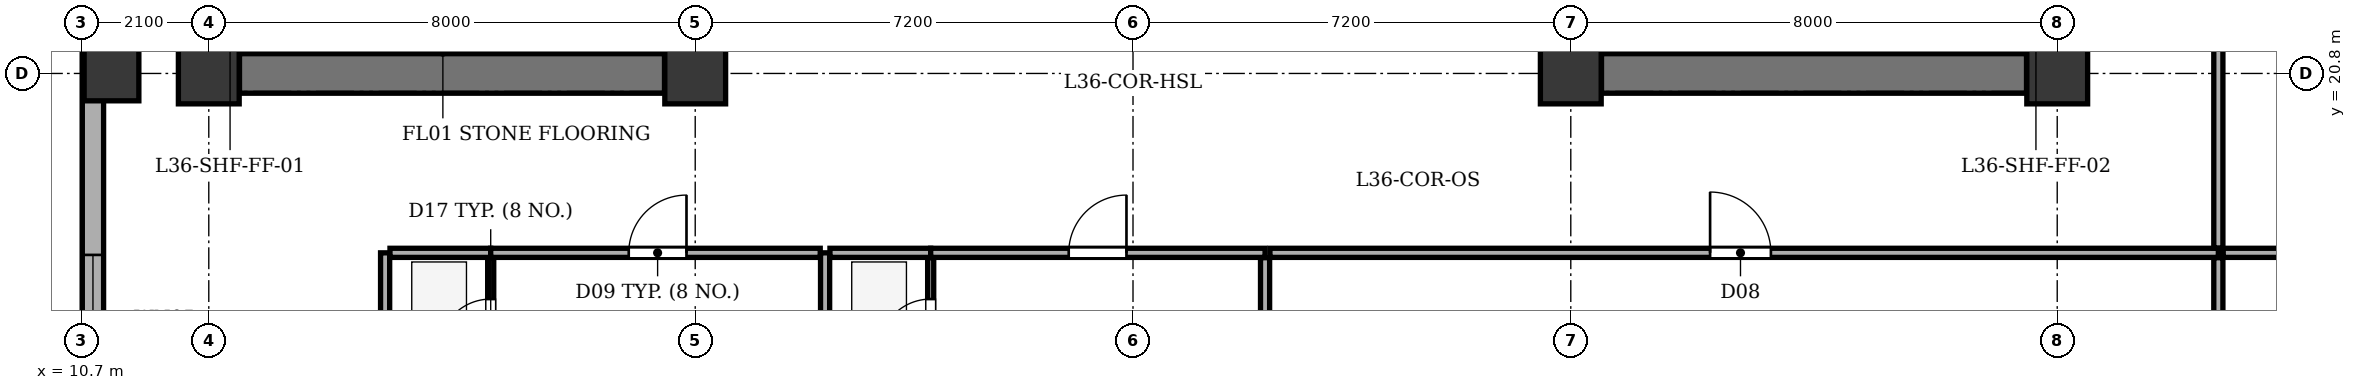
"""IFC4 building model, lengths in metres.
Left out: names, types, materials, properties, quantities, classifications, styles, units other than length and angle.
Written with IfcOpenShell. Run it as: python <this file> out.ifc"""

import sys

from ifc_helpers import new_model, si_unit, direction, frame, frame_2d, origin, origin_2d, place, context, subcontext, project, spatial, rectangle, extrude, element, fill, save


model = new_model("IFC4")
c1 = context("Model", 3, precision=1e-05, world=origin(), true_north=direction((0.0, 1.0)))
c2 = subcontext(c1, "Body", "Model", "MODEL_VIEW")
j1 = project(units=[si_unit("LENGTHUNIT", "METRE"), si_unit("PLANEANGLEUNIT", "RADIAN")], contexts=[c1])
p1 = place(None, origin())
s1 = spatial("IfcSite", under=j1, at=p1, CompositionType="ELEMENT")
p2 = place(p1, origin())
s2 = spatial("IfcBuilding", under=s1, at=p2, CompositionType="ELEMENT")
p3 = place(p2, frame((0.0, 0.0, 144.8)))
s3 = spatial("IfcBuildingStorey", under=s2, at=p3, CompositionType="ELEMENT", Elevation=144.8)
for number, where, z_axis, x_axis in (
    (1, (12.8, 20.8, 0.0), (0.0, 0.0, 1.0), (1.0, 0.0, 0.0)),
    (2, (20.8, 20.8, 0.0), (0.0, 0.0, 1.0), (1.0, 0.0, 0.0)),
    (3, (35.2, 20.8, 0.0), (0.0, 0.0, 1.0), (1.0, 0.0, 0.0)),
    (4, (43.2, 20.8, 0.0), (0.0, 0.0, 1.0), (1.0, 0.0, 0.0)),
):
    element("IfcColumn", number, at=place(p3, frame(where, z_axis=z_axis, x_axis=x_axis)), inside=s3, PredefinedType="COLUMN", context=c2, shape_type="SweptSolid", body=[
        extrude(rectangle(XDim=1.0, YDim=1.0, at=origin_2d()), origin(), (0.0, 0.0, 1.0), 3.5),
    ])
p4 = place(p3, frame((11.2, 20.8, 0.0), z_axis=(0.0, 0.0, 1.0), x_axis=(1.0, 0.0, 0.0)))
e5 = element("IfcColumn", 5, at=p4, inside=s3, PredefinedType="COLUMN", context=c2, shape_type="SweptSolid", body=[
    extrude(rectangle(XDim=0.9, YDim=0.9, at=origin_2d()), origin(), (0.0, 0.0, 1.0), 3.5),
])
p5 = place(p3, frame((10.895, 6.5, 0.0), z_axis=(0.0, 0.0, 1.0), x_axis=(0.0, 1.0, 0.0)))
e6 = element("IfcWall", 6, at=p5, inside=s3, PredefinedType="STANDARD", context=c2, shape_type="SweptSolid", body=[
    extrude(rectangle(XDim=35.0, YDim=0.35, at=frame_2d((17.5, 0.0))), origin(), (0.0, 0.0, 1.0), 2.785),
])
p6 = place(p5, frame((3.31, 0.0, 0.75)))
e7 = element("IfcOpeningElement", 7, at=p6, cuts=e6, PredefinedType="OPENING", context=c2, shape_type="SweptSolid", body=[
    extrude(rectangle(XDim=1.6, YDim=1.75, at=frame_2d((0.8, 0.875))), frame((0.0, 0.185, 0.0), z_axis=(0.0, -1.0, 0.0), x_axis=(1.0, 0.0, 0.0)), (0.0, 0.0, 1.0), 0.37),
])
p7 = place(p5, frame((9.216, 0.0, 0.75)))
e8 = element("IfcOpeningElement", 8, at=p7, cuts=e6, PredefinedType="OPENING", context=c2, shape_type="SweptSolid", body=[
    extrude(rectangle(XDim=2.1, YDim=1.75, at=frame_2d((1.05, 0.875))), frame((0.0, 0.185, 0.0), z_axis=(0.0, -1.0, 0.0), x_axis=(1.0, 0.0, 0.0)), (0.0, 0.0, 1.0), 0.37),
])
p8 = place(p5, frame((17.164, 0.0, 0.75)))
e9 = element("IfcOpeningElement", 9, at=p8, cuts=e6, PredefinedType="OPENING", context=c2, shape_type="SweptSolid", body=[
    extrude(rectangle(XDim=1.6, YDim=1.75, at=frame_2d((0.8, 0.875))), frame((0.0, 0.185, 0.0), z_axis=(0.0, -1.0, 0.0), x_axis=(1.0, 0.0, 0.0)), (0.0, 0.0, 1.0), 0.37),
])
p9 = place(p5, frame((22.386, 0.0, 0.75)))
e10 = element("IfcOpeningElement", 10, at=p9, cuts=e6, PredefinedType="OPENING", context=c2, shape_type="SweptSolid", body=[
    extrude(rectangle(XDim=2.1, YDim=1.75, at=frame_2d((1.05, 0.875))), frame((0.0, 0.185, 0.0), z_axis=(0.0, -1.0, 0.0), x_axis=(1.0, 0.0, 0.0)), (0.0, 0.0, 1.0), 0.37),
])
p10 = place(p5, frame((28.671, 0.0, 0.75)))
e11 = element("IfcOpeningElement", 11, at=p10, cuts=e6, PredefinedType="OPENING", context=c2, shape_type="SweptSolid", body=[
    extrude(rectangle(XDim=1.6, YDim=1.75, at=frame_2d((0.8, 0.875))), frame((0.0, 0.185, 0.0), z_axis=(0.0, -1.0, 0.0), x_axis=(1.0, 0.0, 0.0)), (0.0, 0.0, 1.0), 0.37),
])
p11 = place(p5, frame((31.755, 0.0, 0.75)))
e12 = element("IfcOpeningElement", 12, at=p11, cuts=e6, PredefinedType="OPENING", context=c2, shape_type="SweptSolid", body=[
    extrude(rectangle(XDim=1.6, YDim=1.75, at=frame_2d((0.8, 0.875))), frame((0.0, 0.185, 0.0), z_axis=(0.0, -1.0, 0.0), x_axis=(1.0, 0.0, 0.0)), (0.0, 0.0, 1.0), 0.37),
])
p12 = place(p3, frame((13.305, 20.8, 0.0), z_axis=(0.0, 0.0, 1.0), x_axis=(1.0, 0.0, 0.0)))
e13 = element("IfcWall", 13, at=p12, inside=s3, PredefinedType="SHEAR", context=c2, shape_type="SweptSolid", body=[
    extrude(rectangle(XDim=6.99, YDim=0.65, at=frame_2d((3.495, 0.0))), origin(), (0.0, 0.0, 1.0), 3.2),
])
p13 = place(p3, frame((16.435, 21.135, 0.0), z_axis=(0.0, 0.0, 1.0), x_axis=(0.0, 1.0, 0.0)))
e14 = element("IfcWall", 14, at=p13, inside=s3, PredefinedType="SHEAR", context=c2, shape_type="SweptSolid", body=[
    extrude(rectangle(XDim=12.13, YDim=0.25, at=frame_2d((6.065, 0.0))), origin(), (0.0, 0.0, 1.0), 3.2),
])
p14 = place(p13, frame((0.515, 0.0, 0.0)))
e15 = element("IfcOpeningElement", 15, at=p14, cuts=e14, PredefinedType="OPENING", context=c2, shape_type="SweptSolid", body=[
    extrude(rectangle(XDim=1.2, YDim=2.15, at=frame_2d((0.6, 1.075))), frame((0.0, 0.135, 0.0), z_axis=(0.0, -1.0, 0.0), x_axis=(1.0, 0.0, 0.0)), (0.0, 0.0, 1.0), 0.27),
])
p15 = place(p13, frame((2.665, 0.0, 0.0)))
e16 = element("IfcOpeningElement", 16, at=p15, cuts=e14, PredefinedType="OPENING", context=c2, shape_type="SweptSolid", body=[
    extrude(rectangle(XDim=1.15, YDim=2.15, at=frame_2d((0.575, 1.075))), frame((0.0, 0.135, 0.0), z_axis=(0.0, -1.0, 0.0), x_axis=(1.0, 0.0, 0.0)), (0.0, 0.0, 1.0), 0.27),
])
p16 = place(p3, frame((35.705, 20.8, 0.0), z_axis=(0.0, 0.0, 1.0), x_axis=(1.0, 0.0, 0.0)))
e17 = element("IfcWall", 17, at=p16, inside=s3, PredefinedType="SHEAR", context=c2, shape_type="SweptSolid", body=[
    extrude(rectangle(XDim=6.99, YDim=0.65, at=frame_2d((3.495, 0.0))), origin(), (0.0, 0.0, 1.0), 3.2),
])
p17 = place(p3, frame((39.565, 21.135, 0.0), z_axis=(0.0, 0.0, 1.0), x_axis=(0.0, 1.0, 0.0)))
e18 = element("IfcWall", 18, at=p17, inside=s3, PredefinedType="SHEAR", context=c2, shape_type="SweptSolid", body=[
    extrude(rectangle(XDim=12.13, YDim=0.25, at=frame_2d((6.065, 0.0))), origin(), (0.0, 0.0, 1.0), 3.2),
])
p18 = place(p17, frame((0.515, 0.0, 0.0)))
e19 = element("IfcOpeningElement", 19, at=p18, cuts=e18, PredefinedType="OPENING", context=c2, shape_type="SweptSolid", body=[
    extrude(rectangle(XDim=1.2, YDim=2.15, at=frame_2d((0.6, 1.075))), frame((0.0, 0.135, 0.0), z_axis=(0.0, -1.0, 0.0), x_axis=(1.0, 0.0, 0.0)), (0.0, 0.0, 1.0), 0.27),
])
p19 = place(p17, frame((2.665, 0.0, 0.0)))
e20 = element("IfcOpeningElement", 20, at=p19, cuts=e18, PredefinedType="OPENING", context=c2, shape_type="SweptSolid", body=[
    extrude(rectangle(XDim=1.15, YDim=2.15, at=frame_2d((0.575, 1.075))), frame((0.0, 0.135, 0.0), z_axis=(0.0, -1.0, 0.0), x_axis=(1.0, 0.0, 0.0)), (0.0, 0.0, 1.0), 0.27),
])
for number, where, z_axis, x_axis in (
    (21, (15.7, 1.875, 0.0), (0.0, 0.0, 1.0), (0.0, 1.0, 0.0)),
    (22, (22.936, 1.875, 0.0), (0.0, 0.0, 1.0), (0.0, 1.0, 0.0)),
):
    element("IfcWall", number, at=place(p3, frame(where, z_axis=z_axis, x_axis=x_axis)), inside=s3, PredefinedType="PARTITIONING", context=c2, shape_type="SweptSolid", body=[
        extrude(rectangle(XDim=15.975, YDim=0.15, at=frame_2d((7.988, 0.0))), origin(), (0.0, 0.0, 1.0), 3.2),
    ])
p20 = place(p3, frame((15.78, 17.85, 0.0), z_axis=(0.0, 0.0, 1.0), x_axis=(1.0, 0.0, 0.0)))
e23 = element("IfcWall", 23, at=p20, inside=s3, PredefinedType="PARTITIONING", context=c2, shape_type="SweptSolid", body=[
    extrude(rectangle(XDim=1.656, YDim=0.15, at=frame_2d((0.828, 0.0))), origin(), (0.0, 0.0, 1.0), 3.2),
])
p21 = place(p3, frame((17.437, 17.85, 0.0), z_axis=(0.0, 0.0, 1.0), x_axis=(1.0, 0.0, 0.0)))
e24 = element("IfcWall", 24, at=p21, inside=s3, PredefinedType="PARTITIONING", context=c2, shape_type="SweptSolid", body=[
    extrude(rectangle(XDim=5.419, YDim=0.15, at=frame_2d((2.71, 0.0))), origin(), (0.0, 0.0, 1.0), 3.2),
])
p22 = place(p21, frame((2.27, 0.0, 0.0)))
e25 = element("IfcOpeningElement", 25, at=p22, cuts=e24, PredefinedType="OPENING", context=c2, shape_type="SweptSolid", body=[
    extrude(rectangle(XDim=0.95, YDim=2.1, at=frame_2d((0.475, 1.05))), frame((0.0, 0.085, 0.0), z_axis=(0.0, -1.0, 0.0), x_axis=(1.0, 0.0, 0.0)), (0.0, 0.0, 1.0), 0.17),
])
p23 = place(p3, frame((17.437, 15.52, 0.0), z_axis=(0.0, 0.0, 1.0), x_axis=(0.0, 1.0, 0.0)))
e26 = element("IfcWall", 26, at=p23, inside=s3, PredefinedType="PARTITIONING", context=c2, shape_type="SweptSolid", body=[
    extrude(rectangle(XDim=2.25, YDim=0.1, at=frame_2d((1.125, 0.0))), origin(), (0.0, 0.0, 1.0), 3.2),
])
p24 = place(p23, frame((0.72, 0.0, 0.0)))
e27 = element("IfcOpeningElement", 27, at=p24, cuts=e26, PredefinedType="OPENING", context=c2, shape_type="SweptSolid", body=[
    extrude(rectangle(XDim=0.85, YDim=2.05, at=frame_2d((0.425, 1.025))), frame((0.0, 0.06, 0.0), z_axis=(0.0, -1.0, 0.0), x_axis=(1.0, 0.0, 0.0)), (0.0, 0.0, 1.0), 0.12),
])
p25 = place(p3, frame((23.016, 17.85, 0.0), z_axis=(0.0, 0.0, 1.0), x_axis=(1.0, 0.0, 0.0)))
e28 = element("IfcWall", 28, at=p25, inside=s3, PredefinedType="PARTITIONING", context=c2, shape_type="SweptSolid", body=[
    extrude(rectangle(XDim=1.656, YDim=0.15, at=frame_2d((0.828, 0.0))), origin(), (0.0, 0.0, 1.0), 3.2),
])
p26 = place(p3, frame((24.673, 17.85, 0.0), z_axis=(0.0, 0.0, 1.0), x_axis=(1.0, 0.0, 0.0)))
e29 = element("IfcWall", 29, at=p26, inside=s3, PredefinedType="PARTITIONING", context=c2, shape_type="SweptSolid", body=[
    extrude(rectangle(XDim=5.5, YDim=0.15, at=frame_2d((2.75, 0.0))), origin(), (0.0, 0.0, 1.0), 3.2),
])
p27 = place(p26, frame((2.27, 0.0, 0.0)))
e30 = element("IfcOpeningElement", 30, at=p27, cuts=e29, PredefinedType="OPENING", context=c2, shape_type="SweptSolid", body=[
    extrude(rectangle(XDim=0.95, YDim=2.1, at=frame_2d((0.475, 1.05))), frame((0.0, 0.085, 0.0), z_axis=(0.0, -1.0, 0.0), x_axis=(1.0, 0.0, 0.0)), (0.0, 0.0, 1.0), 0.17),
])
p28 = place(p3, frame((24.673, 15.52, 0.0), z_axis=(0.0, 0.0, 1.0), x_axis=(0.0, 1.0, 0.0)))
e31 = element("IfcWall", 31, at=p28, inside=s3, PredefinedType="PARTITIONING", context=c2, shape_type="SweptSolid", body=[
    extrude(rectangle(XDim=2.25, YDim=0.1, at=frame_2d((1.125, 0.0))), origin(), (0.0, 0.0, 1.0), 3.2),
])
p29 = place(p28, frame((0.72, 0.0, 0.0)))
e32 = element("IfcOpeningElement", 32, at=p29, cuts=e31, PredefinedType="OPENING", context=c2, shape_type="SweptSolid", body=[
    extrude(rectangle(XDim=0.85, YDim=2.05, at=frame_2d((0.425, 1.025))), frame((0.0, 0.06, 0.0), z_axis=(0.0, -1.0, 0.0), x_axis=(1.0, 0.0, 0.0)), (0.0, 0.0, 1.0), 0.12),
])
p30 = place(p3, frame((30.172, 1.875, 0.0), z_axis=(0.0, 0.0, 1.0), x_axis=(0.0, 1.0, 0.0)))
e33 = element("IfcWall", 33, at=p30, inside=s3, PredefinedType="PARTITIONING", context=c2, shape_type="SweptSolid", body=[
    extrude(rectangle(XDim=15.895, YDim=0.15, at=frame_2d((7.948, 0.0))), origin(), (0.0, 0.0, 1.0), 3.2),
])
p31 = place(p3, frame((30.252, 17.85, 0.0), z_axis=(0.0, 0.0, 1.0), x_axis=(1.0, 0.0, 0.0)))
e34 = element("IfcWall", 34, at=p31, inside=s3, PredefinedType="PARTITIONING", context=c2, shape_type="SweptSolid", body=[
    extrude(rectangle(XDim=15.598, YDim=0.15, at=frame_2d((7.799, 0.0))), origin(), (0.0, 0.0, 1.0), 3.2),
])
p32 = place(p31, frame((7.239, 0.0, 0.0)))
e35 = element("IfcOpeningElement", 35, at=p32, cuts=e34, PredefinedType="OPENING", context=c2, shape_type="SweptSolid", body=[
    extrude(rectangle(XDim=1.0, YDim=2.1, at=frame_2d((0.5, 1.05))), frame((0.0, 0.085, 0.0), z_axis=(0.0, -1.0, 0.0), x_axis=(1.0, 0.0, 0.0)), (0.0, 0.0, 1.0), 0.17),
])
p33 = place(p3, frame((45.85, 1.875, 0.0), z_axis=(0.0, 0.0, 1.0), x_axis=(0.0, 1.0, 0.0)))
e36 = element("IfcWall", 36, at=p33, inside=s3, PredefinedType="PARTITIONING", context=c2, shape_type="SweptSolid", body=[
    extrude(rectangle(XDim=15.895, YDim=0.15, at=frame_2d((7.948, 0.0))), origin(), (0.0, 0.0, 1.0), 3.2),
])
p34 = place(p3, frame((45.93, 17.85, 0.0), z_axis=(0.0, 0.0, 1.0), x_axis=(1.0, 0.0, 0.0)))
e37 = element("IfcWall", 37, at=p34, inside=s3, PredefinedType="PARTITIONING", context=c2, shape_type="SweptSolid", body=[
    extrude(rectangle(XDim=9.395, YDim=0.15, at=frame_2d((4.698, 0.0))), origin(), (0.0, 0.0, 1.0), 3.2),
])
p35 = place(p3, frame((45.85, 17.93, 0.0), z_axis=(0.0, 0.0, 1.0), x_axis=(0.0, 1.0, 0.0)))
e38 = element("IfcWall", 38, at=p35, inside=s3, PredefinedType="PARTITIONING", context=c2, shape_type="SweptSolid", body=[
    extrude(rectangle(XDim=18.54, YDim=0.15, at=frame_2d((9.27, 0.0))), origin(), (0.0, 0.0, 1.0), 3.2),
])
p36 = place(p35, frame((8.79, 0.0, 0.0)))
e39 = element("IfcOpeningElement", 39, at=p36, cuts=e38, PredefinedType="OPENING", context=c2, shape_type="SweptSolid", body=[
    extrude(rectangle(XDim=0.95, YDim=2.1, at=frame_2d((0.475, 1.05))), frame((0.0, 0.085, 0.0), z_axis=(0.0, -1.0, 0.0), x_axis=(1.0, 0.0, 0.0)), (0.0, 0.0, 1.0), 0.17),
])
p37 = place(p7, origin())
e40 = element("IfcWindow", 40, at=p37, inside=s3, PartitioningType="SINGLE_PANEL", PredefinedType="WINDOW", context=c2, shape_type="SweptSolid", body=[
    extrude(rectangle(XDim=2.1, YDim=1.75, at=frame_2d((1.05, 0.875))), frame((0.0, -0.01, 0.0), z_axis=(0.0, -1.0, 0.0), x_axis=(1.0, 0.0, 0.0)), (0.0, 0.0, 1.0), 0.06),
])
fill(e8, e40)
p38 = place(p24, origin())
e41 = element("IfcDoor", 41, at=p38, inside=s3, OperationType="SINGLE_SWING_LEFT", PredefinedType="DOOR", context=c2, shape_type="SweptSolid", body=[
    extrude(rectangle(XDim=0.85, YDim=2.05, at=frame_2d((0.425, 1.025))), frame((0.0, 0.025, 0.0), z_axis=(0.0, -1.0, 0.0), x_axis=(1.0, 0.0, 0.0)), (0.0, 0.0, 1.0), 0.05),
])
fill(e27, e41)
p39 = place(p22, origin())
e42 = element("IfcDoor", 42, at=p39, inside=s3, OperationType="SINGLE_SWING_RIGHT", PredefinedType="DOOR", context=c2, shape_type="SweptSolid", body=[
    extrude(rectangle(XDim=0.95, YDim=2.1, at=frame_2d((0.475, 1.05))), frame((0.0, 0.025, 0.0), z_axis=(0.0, -1.0, 0.0), x_axis=(1.0, 0.0, 0.0)), (0.0, 0.0, 1.0), 0.05),
])
fill(e25, e42)
p40 = place(p29, origin())
e43 = element("IfcDoor", 43, at=p40, inside=s3, OperationType="SINGLE_SWING_LEFT", PredefinedType="DOOR", context=c2, shape_type="SweptSolid", body=[
    extrude(rectangle(XDim=0.85, YDim=2.05, at=frame_2d((0.425, 1.025))), frame((0.0, 0.025, 0.0), z_axis=(0.0, -1.0, 0.0), x_axis=(1.0, 0.0, 0.0)), (0.0, 0.0, 1.0), 0.05),
])
fill(e32, e43)
p41 = place(p27, origin())
e44 = element("IfcDoor", 44, at=p41, inside=s3, OperationType="SINGLE_SWING_RIGHT", PredefinedType="DOOR", context=c2, shape_type="SweptSolid", body=[
    extrude(rectangle(XDim=0.95, YDim=2.1, at=frame_2d((0.475, 1.05))), frame((0.0, 0.025, 0.0), z_axis=(0.0, -1.0, 0.0), x_axis=(1.0, 0.0, 0.0)), (0.0, 0.0, 1.0), 0.05),
])
fill(e30, e44)
p42 = place(p32, origin())
e45 = element("IfcDoor", 45, at=p42, inside=s3, OperationType="SINGLE_SWING_LEFT", PredefinedType="DOOR", context=c2, shape_type="SweptSolid", body=[
    extrude(rectangle(XDim=1.0, YDim=2.1, at=frame_2d((0.5, 1.05))), frame((0.0, 0.025, 0.0), z_axis=(0.0, -1.0, 0.0), x_axis=(1.0, 0.0, 0.0)), (0.0, 0.0, 1.0), 0.05),
])
fill(e35, e45)
save(model, sys.argv[1])
